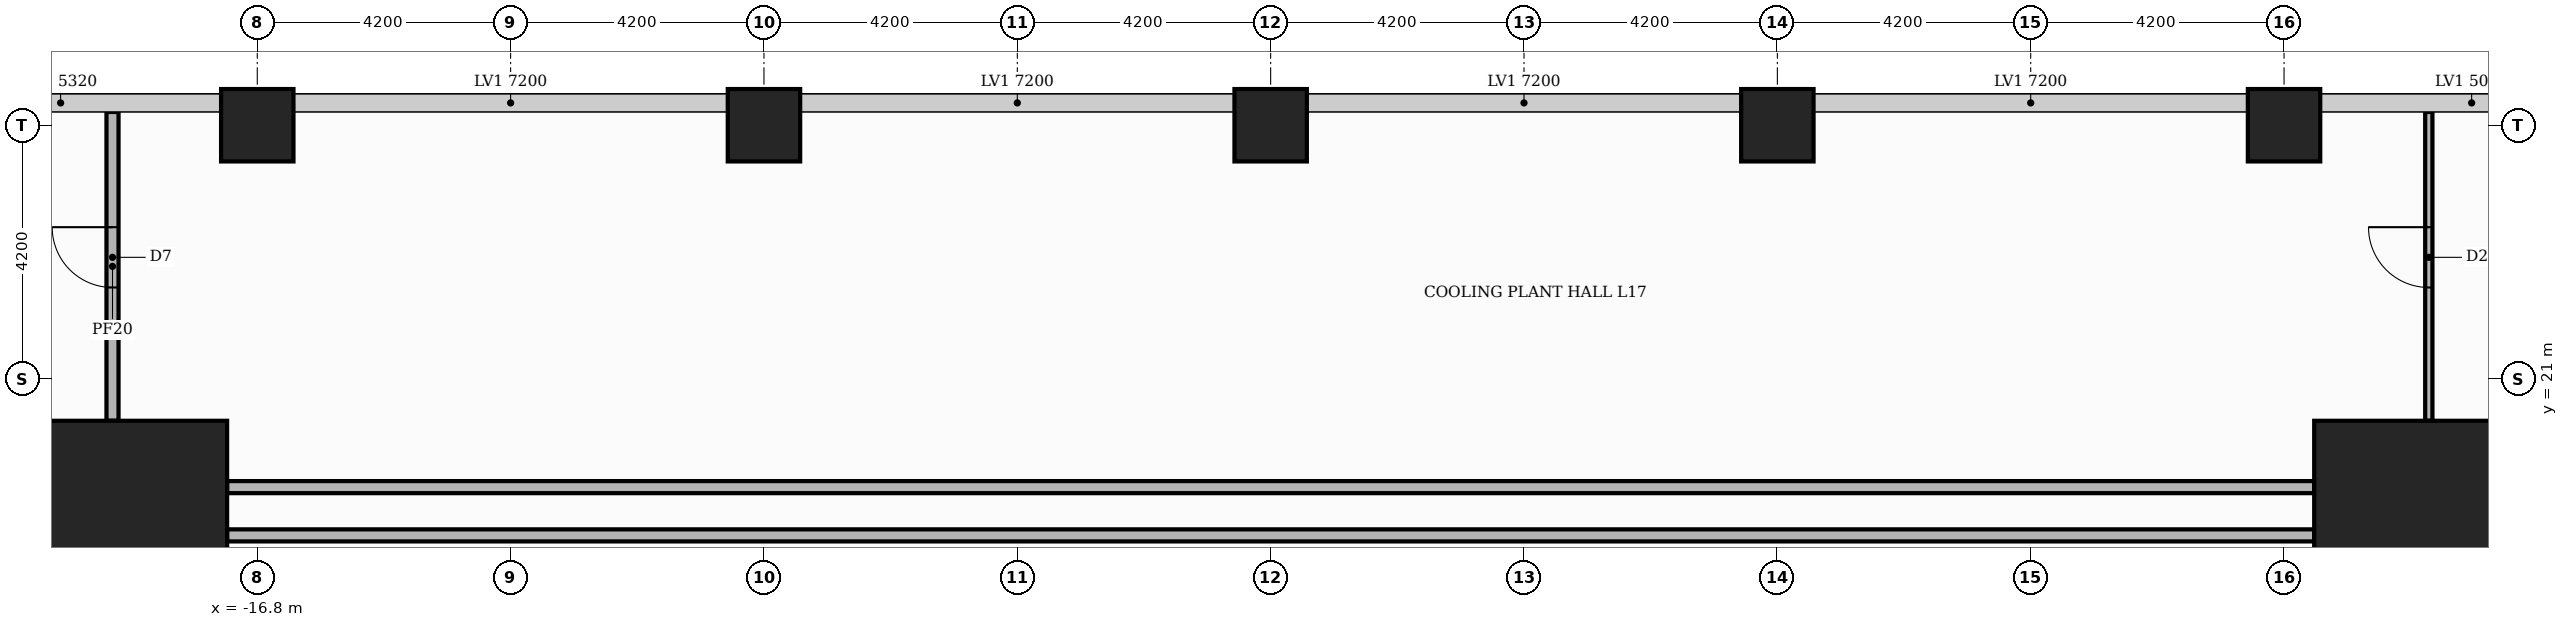
"""IFC4 building model, lengths in metres.
Left out: names, types, materials, properties, quantities, classifications, styles, units other than length and angle.
Written with IfcOpenShell. Run it as: python <this file> out.ifc"""

import sys

from ifc_helpers import new_model, si_unit, direction, frame, frame_2d, origin, origin_2d, place, context, subcontext, project, spatial, rectangle, extrude, element, fill, save


model = new_model("IFC4")
c1 = context("Model", 3, precision=1e-05, world=origin(), true_north=direction((0.0, 1.0)))
c2 = subcontext(c1, "Body", "Model", "MODEL_VIEW")
j1 = project(units=[si_unit("LENGTHUNIT", "METRE"), si_unit("PLANEANGLEUNIT", "RADIAN")], contexts=[c1])
p1 = place(None, origin())
s1 = spatial("IfcSite", under=j1, at=p1, CompositionType="ELEMENT")
p2 = place(p1, origin())
s2 = spatial("IfcBuilding", under=s1, at=p2, CompositionType="ELEMENT")
p3 = place(p2, frame((0.0, 0.0, 73.8)))
s3 = spatial("IfcBuildingStorey", under=s2, at=p3, CompositionType="ELEMENT", Elevation=73.8)
for number, where, z_axis, x_axis in (
    (1, (18.8, 18.8, 0.0), (0.0, 0.0, 1.0), (1.0, 0.0, 0.0)),
    (2, (-18.8, 18.8, 0.0), (0.0, 0.0, 1.0), (1.0, 0.0, 0.0)),
):
    element("IfcColumn", number, at=place(p3, frame(where, z_axis=z_axis, x_axis=x_axis)), inside=s3, PredefinedType="COLUMN", context=c2, shape_type="SweptSolid", body=[
        extrude(rectangle(XDim=3.0, YDim=3.0, at=origin_2d()), origin(), (0.0, 0.0, 1.0), 5.4),
    ])
for number, where, z_axis, x_axis in (
    (3, (0.0, 25.2, 0.0), (0.0, 0.0, 1.0), (1.0, 0.0, 0.0)),
    (4, (-8.4, 25.2, 0.0), (0.0, 0.0, 1.0), (1.0, 0.0, 0.0)),
    (5, (-16.8, 25.2, 0.0), (0.0, 0.0, 1.0), (1.0, 0.0, 0.0)),
    (6, (8.4, 25.2, 0.0), (0.0, 0.0, 1.0), (1.0, 0.0, 0.0)),
    (7, (16.8, 25.2, 0.0), (0.0, 0.0, 1.0), (1.0, 0.0, 0.0)),
):
    element("IfcColumn", number, at=place(p3, frame(where, z_axis=z_axis, x_axis=x_axis)), inside=s3, PredefinedType="COLUMN", context=c2, shape_type="SweptSolid", body=[
        extrude(rectangle(XDim=1.2, YDim=1.2, at=origin_2d()), origin(), (0.0, 0.0, 1.0), 5.4),
    ])
for number, where, z_axis, x_axis in (
    (8, (-17.3, 18.4, 0.0), (0.0, 0.0, 1.0), (1.0, 0.0, 0.0)),
    (9, (-17.3, 19.2, 0.0), (0.0, 0.0, 1.0), (1.0, 0.0, 0.0)),
):
    element("IfcWall", number, at=place(p3, frame(where, z_axis=z_axis, x_axis=x_axis)), inside=s3, PredefinedType="PARTITIONING", context=c2, shape_type="SweptSolid", body=[
        extrude(rectangle(XDim=34.6, YDim=0.2, at=frame_2d((17.3, 0.0))), origin(), (0.0, 0.0, 1.0), 4.98),
    ])
p4 = place(p3, frame((-19.2, 20.3, 0.0), z_axis=(0.0, 0.0, 1.0), x_axis=(0.0, 1.0, 0.0)))
e10 = element("IfcWall", 10, at=p4, inside=s3, PredefinedType="PARTITIONING", context=c2, shape_type="SweptSolid", body=[
    extrude(rectangle(XDim=5.12, YDim=0.2, at=frame_2d((2.56, 0.0))), origin(), (0.0, 0.0, 1.0), 4.98),
])
p5 = place(p4, frame((2.21, 0.0, 0.0)))
e11 = element("IfcOpeningElement", 11, at=p5, cuts=e10, PredefinedType="OPENING", context=c2, shape_type="SweptSolid", body=[
    extrude(rectangle(XDim=1.0, YDim=2.1, at=frame_2d((0.5, 1.05))), frame((0.0, 0.11, 0.0), z_axis=(0.0, -1.0, 0.0), x_axis=(1.0, 0.0, 0.0)), (0.0, 0.0, 1.0), 0.22),
])
p6 = place(p3, frame((19.2, 20.3, 0.0), z_axis=(0.0, 0.0, 1.0), x_axis=(0.0, 1.0, 0.0)))
e12 = element("IfcWall", 12, at=p6, inside=s3, PredefinedType="PARTITIONING", context=c2, shape_type="SweptSolid", body=[
    extrude(rectangle(XDim=5.12, YDim=0.12, at=frame_2d((2.56, 0.0))), origin(), (0.0, 0.0, 1.0), 4.98),
])
p7 = place(p6, frame((2.21, 0.0, 0.0)))
e13 = element("IfcOpeningElement", 13, at=p7, cuts=e12, PredefinedType="OPENING", context=c2, shape_type="SweptSolid", body=[
    extrude(rectangle(XDim=1.0, YDim=2.1, at=frame_2d((0.5, 1.05))), frame((0.0, 0.07, 0.0), z_axis=(0.0, -1.0, 0.0), x_axis=(1.0, 0.0, 0.0)), (0.0, 0.0, 1.0), 0.14),
])
p8 = place(p7, origin())
e14 = element("IfcDoor", 14, at=p8, inside=s3, OperationType="SINGLE_SWING_RIGHT", PredefinedType="DOOR", context=c2, shape_type="SweptSolid", body=[
    extrude(rectangle(XDim=1.0, YDim=2.1, at=frame_2d((0.5, 1.05))), frame((0.0, 0.025, 0.0), z_axis=(0.0, -1.0, 0.0), x_axis=(1.0, 0.0, 0.0)), (0.0, 0.0, 1.0), 0.05),
])
fill(e13, e14)
p9 = place(p5, origin())
e15 = element("IfcDoor", 15, at=p9, inside=s3, OperationType="SINGLE_SWING_RIGHT", PredefinedType="DOOR", context=c2, shape_type="SweptSolid", body=[
    extrude(rectangle(XDim=1.0, YDim=2.1, at=frame_2d((0.5, 1.05))), frame((0.0, 0.025, 0.0), z_axis=(0.0, -1.0, 0.0), x_axis=(1.0, 0.0, 0.0)), (0.0, 0.0, 1.0), 0.05),
])
fill(e11, e15)
save(model, sys.argv[1])
